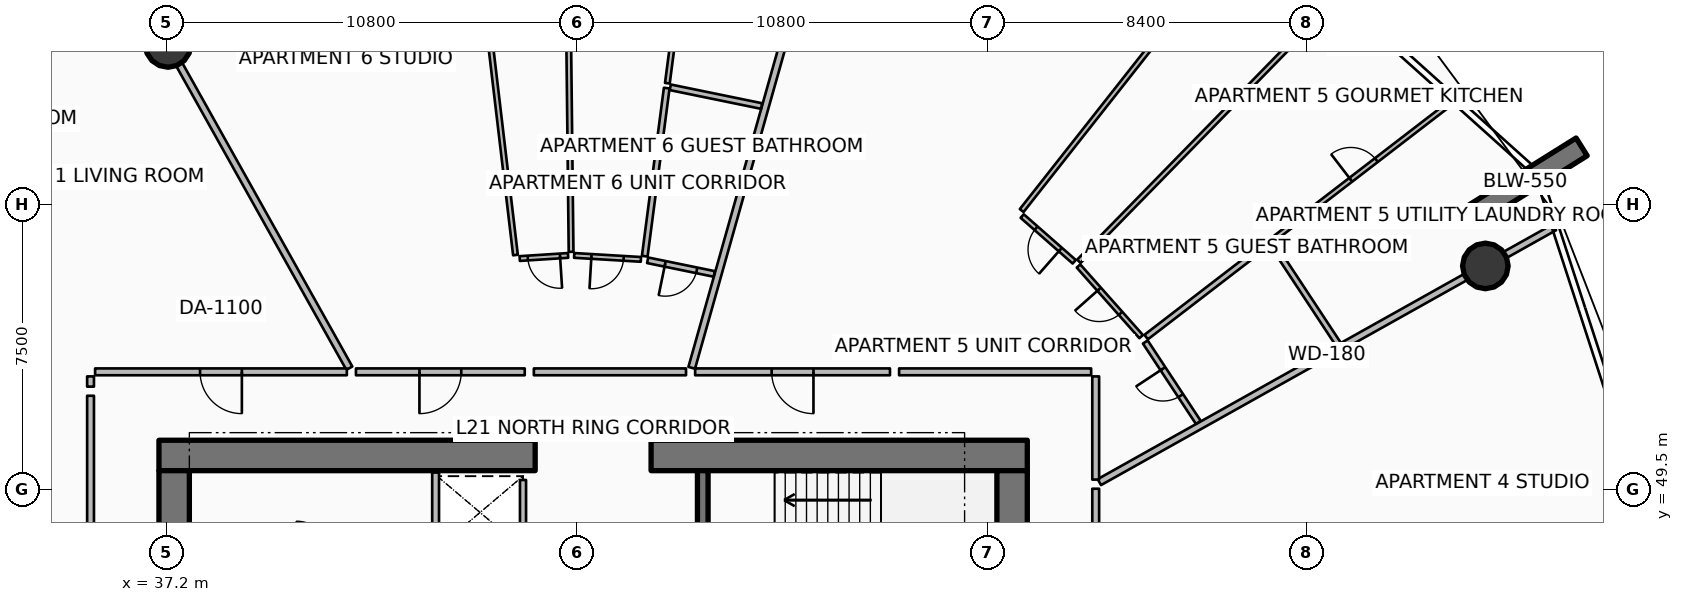
"""IFC4 building model, lengths in metres.
Left out: names, types, materials, properties, quantities, classifications, styles, units other than length and angle.
Written with IfcOpenShell. Run it as: python <this file> out.ifc"""

import sys

from ifc_helpers import new_model, si_unit, direction, frame, frame_2d, origin, origin_2d, place, context, subcontext, project, spatial, rectangle, circle, extrude, element, fill, save


model = new_model("IFC4")
c1 = context("Model", 3, precision=1e-05, world=origin(), true_north=direction((0.0, 1.0)))
c2 = subcontext(c1, "Body", "Model", "MODEL_VIEW")
j1 = project(units=[si_unit("LENGTHUNIT", "METRE"), si_unit("PLANEANGLEUNIT", "RADIAN")], contexts=[c1])
p1 = place(None, origin())
s1 = spatial("IfcSite", under=j1, at=p1, CompositionType="ELEMENT")
p2 = place(p1, origin())
s2 = spatial("IfcBuilding", under=s1, at=p2, CompositionType="ELEMENT")
p3 = place(p2, frame((0.0, 0.0, 86.4)))
s3 = spatial("IfcBuildingStorey", under=s2, at=p3, CompositionType="ELEMENT", Elevation=86.4)
p4 = place(p3, frame((37.0, 50.4, 0.0), z_axis=(0.0, 0.0, 1.0), x_axis=(1.0, 0.0, 0.0)))
e1 = element("IfcWall", 1, at=p4, inside=s3, PredefinedType="SHEAR", context=c2, shape_type="SweptSolid", body=[
    extrude(rectangle(XDim=9.9, YDim=0.8, at=frame_2d((4.95, 0.0))), origin(), (0.0, 0.0, 1.0), 3.75),
])
p5 = place(p3, frame((49.95, 50.4, 0.0), z_axis=(0.0, 0.0, 1.0), x_axis=(1.0, 0.0, 0.0)))
e2 = element("IfcWall", 2, at=p5, inside=s3, PredefinedType="SHEAR", context=c2, shape_type="SweptSolid", body=[
    extrude(rectangle(XDim=9.9, YDim=0.8, at=frame_2d((4.95, 0.0))), origin(), (0.0, 0.0, 1.0), 3.75),
])
for number, where, z_axis, x_axis in (
    (3, (37.4, 34.0, 0.0), (0.0, 0.0, 1.0), (0.0, 1.0, 0.0)),
    (4, (59.45, 34.0, 0.0), (0.0, 0.0, 1.0), (0.0, 1.0, 0.0)),
):
    element("IfcWall", number, at=place(p3, frame(where, z_axis=z_axis, x_axis=x_axis)), inside=s3, PredefinedType="SHEAR", context=c2, shape_type="SweptSolid", body=[
        extrude(rectangle(XDim=16.0, YDim=0.8, at=frame_2d((8.0, 0.0))), origin(), (0.0, 0.0, 1.0), 3.75),
    ])
p6 = place(p3, frame((51.31, 46.5, 0.0), z_axis=(0.0, 0.0, 1.0), x_axis=(0.0, 1.0, 0.0)))
e5 = element("IfcWall", 5, at=p6, inside=s3, PredefinedType="SHEAR", context=c2, shape_type="SweptSolid", body=[
    extrude(rectangle(XDim=3.5, YDim=0.28, at=frame_2d((1.75, 0.0))), origin(), (0.0, 0.0, 1.0), 3.75),
])
p7 = place(p3, frame((71.469, 56.665, 0.0), z_axis=(0.0, 0.0, 1.0), x_axis=(0.848053161125, 0.529911158502, 0.0)))
e6 = element("IfcWall", 6, at=p7, inside=s3, PredefinedType="SOLIDWALL", context=c2, shape_type="SweptSolid", body=[
    extrude(rectangle(XDim=3.5, YDim=0.55, at=frame_2d((1.75, 0.0))), origin(), (0.0, 0.0, 1.0), 3.75),
])
for number, where, z_axis, x_axis in (
    (7, (71.903, 55.386, 0.0), (0.0, 0.0, 1.0), (1.0, 0.0, 0.0)),
    (8, (37.24, 61.214, 0.0), (0.0, 0.0, 1.0), (1.0, 0.0, 0.0)),
):
    element("IfcColumn", number, at=place(p3, frame(where, z_axis=z_axis, x_axis=x_axis)), inside=s3, PredefinedType="COLUMN", context=c2, shape_type="SweptSolid", body=[
        extrude(circle(Radius=0.6, at=origin_2d()), origin(), (0.0, 0.0, 1.0), 3.5),
    ])
p8 = place(p3, frame((46.58, 48.045, 0.0), z_axis=(0.0, 0.0, 1.0), x_axis=(0.0, 1.0, 0.0)))
e9 = element("IfcWall", 9, at=p8, inside=s3, PredefinedType="PARTITIONING", context=c2, shape_type="SweptSolid", body=[
    extrude(rectangle(XDim=1.71, YDim=0.16, at=frame_2d((0.855, 0.0))), origin(), (0.0, 0.0, 1.0), 3.5),
])
p9 = place(p3, frame((44.28, 47.82, 0.0), z_axis=(0.0, 0.0, 1.0), x_axis=(0.0, 1.0, 0.0)))
e10 = element("IfcWall", 10, at=p9, inside=s3, PredefinedType="PARTITIONING", context=c2, shape_type="SweptSolid", body=[
    extrude(rectangle(XDim=2.13, YDim=0.18, at=frame_2d((1.065, 0.0))), origin(), (0.0, 0.0, 1.0), 3.5),
])
p10 = place(p3, frame((61.746, 49.698, 0.0), z_axis=(0.0, 0.0, 1.0), x_axis=(0.872489938668, 0.488632077256, 0.0)))
e11 = element("IfcWall", 11, at=p10, inside=s3, PredefinedType="PARTITIONING", context=c2, shape_type="SweptSolid", body=[
    extrude(rectangle(XDim=13.725, YDim=0.18, at=frame_2d((6.862, 0.0))), origin(), (0.0, 0.0, 1.0), 2.94),
])
p11 = place(p3, frame((51.019, 52.706, 0.0), z_axis=(0.0, 0.0, 1.0), x_axis=(0.271450895995, 0.962452290279, 0.0)))
e12 = element("IfcWall", 12, at=p11, inside=s3, PredefinedType="PARTITIONING", context=c2, shape_type="SweptSolid", body=[
    extrude(rectangle(XDim=15.014, YDim=0.18, at=frame_2d((7.507, 0.0))), origin(), (0.0, 0.0, 1.0), 2.94),
])
p12 = place(p3, frame((42.01, 52.696, 0.0), z_axis=(0.0, 0.0, 1.0), x_axis=(-0.488628442553, 0.872491974249, 0.0)))
e13 = element("IfcWall", 13, at=p12, inside=s3, PredefinedType="PARTITIONING", context=c2, shape_type="SweptSolid", body=[
    extrude(rectangle(XDim=11.563, YDim=0.18, at=frame_2d((5.782, 0.0))), origin(), (0.0, 0.0, 1.0), 2.94),
])
p13 = place(p3, frame((41.944, 52.6, 0.0), z_axis=(0.0, 0.0, 1.0), x_axis=(-1.0, 0.0, 0.0)))
e14 = element("IfcWall", 14, at=p13, inside=s3, PredefinedType="PARTITIONING", context=c2, shape_type="SweptSolid", body=[
    extrude(rectangle(XDim=6.624, YDim=0.18, at=frame_2d((3.312, 0.0))), origin(), (0.0, 0.0, 1.0), 2.94),
])
p14 = place(p13, frame((2.762, 0.0, 0.0)))
e15 = element("IfcOpeningElement", 15, at=p14, cuts=e14, PredefinedType="OPENING", context=c2, shape_type="SweptSolid", body=[
    extrude(rectangle(XDim=1.1, YDim=2.1, at=frame_2d((0.55, 1.05))), frame((0.0, 0.1, 0.0), z_axis=(0.0, -1.0, 0.0), x_axis=(1.0, 0.0, 0.0)), (0.0, 0.0, 1.0), 0.2),
])
p15 = place(p3, frame((35.2, 52.48, 0.0), z_axis=(0.0, 0.0, 1.0), x_axis=(0.0, -1.0, 0.0)))
e16 = element("IfcWall", 16, at=p15, inside=s3, PredefinedType="PARTITIONING", context=c2, shape_type="SweptSolid", body=[
    extrude(rectangle(XDim=0.269, YDim=0.18, at=frame_2d((0.135, 0.0))), origin(), (0.0, 0.0, 1.0), 2.94),
])
p16 = place(p3, frame((35.2, 51.971, 0.0), z_axis=(0.0, 0.0, 1.0), x_axis=(0.0, -1.0, 0.0)))
e17 = element("IfcWall", 17, at=p16, inside=s3, PredefinedType="PARTITIONING", context=c2, shape_type="SweptSolid", body=[
    extrude(rectangle(XDim=6.241, YDim=0.18, at=frame_2d((3.12, 0.0))), origin(), (0.0, 0.0, 1.0), 2.94),
])
p17 = place(p3, frame((61.65, 43.736, 0.0), z_axis=(0.0, 0.0, 1.0), x_axis=(0.0, 1.0, 0.0)))
e18 = element("IfcWall", 18, at=p17, inside=s3, PredefinedType="PARTITIONING", context=c2, shape_type="SweptSolid", body=[
    extrude(rectangle(XDim=5.789, YDim=0.18, at=frame_2d((2.895, 0.0))), origin(), (0.0, 0.0, 1.0), 2.94),
])
p18 = place(p17, frame((2.344, 0.0, 0.0)))
e19 = element("IfcOpeningElement", 19, at=p18, cuts=e18, PredefinedType="OPENING", context=c2, shape_type="SweptSolid", body=[
    extrude(rectangle(XDim=1.1, YDim=2.1, at=frame_2d((0.55, 1.05))), frame((0.0, 0.1, 0.0), z_axis=(0.0, -1.0, 0.0), x_axis=(1.0, 0.0, 0.0)), (0.0, 0.0, 1.0), 0.2),
])
p19 = place(p3, frame((56.236, 52.6, 0.0), z_axis=(0.0, 0.0, 1.0), x_axis=(-1.0, 0.0, 0.0)))
e20 = element("IfcWall", 20, at=p19, inside=s3, PredefinedType="PARTITIONING", context=c2, shape_type="SweptSolid", body=[
    extrude(rectangle(XDim=5.127, YDim=0.18, at=frame_2d((2.563, 0.0))), origin(), (0.0, 0.0, 1.0), 2.94),
])
p20 = place(p19, frame((2.013, 0.0, 0.0)))
e21 = element("IfcOpeningElement", 21, at=p20, cuts=e20, PredefinedType="OPENING", context=c2, shape_type="SweptSolid", body=[
    extrude(rectangle(XDim=1.1, YDim=2.1, at=frame_2d((0.55, 1.05))), frame((0.0, 0.1, 0.0), z_axis=(0.0, -1.0, 0.0), x_axis=(1.0, 0.0, 0.0)), (0.0, 0.0, 1.0), 0.2),
])
p21 = place(p3, frame((61.65, 49.764, 0.0), z_axis=(0.0, 0.0, 1.0), x_axis=(0.0, 1.0, 0.0)))
e22 = element("IfcWall", 22, at=p21, inside=s3, PredefinedType="PARTITIONING", context=c2, shape_type="SweptSolid", body=[
    extrude(rectangle(XDim=2.716, YDim=0.18, at=frame_2d((1.358, 0.0))), origin(), (0.0, 0.0, 1.0), 2.94),
])
p22 = place(p3, frame((61.53, 52.6, 0.0), z_axis=(0.0, 0.0, 1.0), x_axis=(-1.0, 0.0, 0.0)))
e23 = element("IfcWall", 23, at=p22, inside=s3, PredefinedType="PARTITIONING", context=c2, shape_type="SweptSolid", body=[
    extrude(rectangle(XDim=5.054, YDim=0.18, at=frame_2d((2.527, 0.0))), origin(), (0.0, 0.0, 1.0), 2.94),
])
p23 = place(p3, frame((59.702, 56.844, 0.0), z_axis=(0.0, 0.0, 1.0), x_axis=(0.619083405129, 0.785325243128, 0.0)))
e24 = element("IfcWall", 24, at=p23, inside=s3, PredefinedType="PARTITIONING", context=c2, shape_type="SweptSolid", body=[
    extrude(rectangle(XDim=9.769, YDim=0.125, at=frame_2d((4.885, 0.0))), origin(), (0.0, 0.0, 1.0), 2.94),
])
p24 = place(p3, frame((64.35, 51.271, 0.0), z_axis=(0.0, 0.0, 1.0), x_axis=(-0.550510405652, 0.83482830167, 0.0)))
e25 = element("IfcWall", 25, at=p24, inside=s3, PredefinedType="PARTITIONING", context=c2, shape_type="SweptSolid", body=[
    extrude(rectangle(XDim=2.532, YDim=0.15, at=frame_2d((1.266, 0.0))), origin(), (0.0, 0.0, 1.0), 2.94),
])
p25 = place(p24, frame((0.841, 0.0, 0.0)))
e26 = element("IfcOpeningElement", 26, at=p25, cuts=e25, PredefinedType="OPENING", context=c2, shape_type="SweptSolid", body=[
    extrude(rectangle(XDim=0.85, YDim=2.06, at=frame_2d((0.425, 1.03))), frame((0.0, 0.085, 0.0), z_axis=(0.0, -1.0, 0.0), x_axis=(1.0, 0.0, 0.0)), (0.0, 0.0, 1.0), 0.17),
])
p26 = place(p3, frame((68.031, 53.333, 0.0), z_axis=(0.0, 0.0, 1.0), x_axis=(-0.550480727927, 0.83484787128, 0.0)))
e27 = element("IfcWall", 27, at=p26, inside=s3, PredefinedType="PARTITIONING", context=c2, shape_type="SweptSolid", body=[
    extrude(rectangle(XDim=3.143, YDim=0.15, at=frame_2d((1.572, 0.0))), origin(), (0.0, 0.0, 1.0), 2.94),
])
p27 = place(p3, frame((62.978, 53.514, 0.0), z_axis=(0.0, 0.0, 1.0), x_axis=(0.792801485355, 0.609479946199, 0.0)))
e28 = element("IfcWall", 28, at=p27, inside=s3, PredefinedType="PARTITIONING", context=c2, shape_type="SweptSolid", body=[
    extrude(rectangle(XDim=4.09, YDim=0.15, at=frame_2d((2.045, 0.0))), origin(), (0.0, 0.0, 1.0), 2.94),
])
p28 = place(p3, frame((66.323, 56.086, 0.0), z_axis=(0.0, 0.0, 1.0), x_axis=(0.792792040596, 0.60949223159, 0.0)))
e29 = element("IfcWall", 29, at=p28, inside=s3, PredefinedType="PARTITIONING", context=c2, shape_type="SweptSolid", body=[
    extrude(rectangle(XDim=5.994, YDim=0.125, at=frame_2d((2.997, 0.0))), origin(), (0.0, 0.0, 1.0), 2.94),
])
p29 = place(p28, frame((2.572, 0.0, 0.0)))
e30 = element("IfcOpeningElement", 30, at=p29, cuts=e29, PredefinedType="OPENING", context=c2, shape_type="SweptSolid", body=[
    extrude(rectangle(XDim=0.85, YDim=2.06, at=frame_2d((0.425, 1.03))), frame((0.0, 0.073, 0.0), z_axis=(0.0, -1.0, 0.0), x_axis=(1.0, 0.0, 0.0)), (0.0, 0.0, 1.0), 0.145),
])
p30 = place(p3, frame((61.208, 55.508, 0.0), z_axis=(0.0, 0.0, 1.0), x_axis=(0.699096858951, 0.715026979774, 0.0)))
e31 = element("IfcWall", 31, at=p30, inside=s3, PredefinedType="PARTITIONING", context=c2, shape_type="SweptSolid", body=[
    extrude(rectangle(XDim=9.747, YDim=0.125, at=frame_2d((4.874, 0.0))), origin(), (0.0, 0.0, 1.0), 2.94),
])
p31 = place(p3, frame((62.846, 53.527, 0.0), z_axis=(0.0, 0.0, 1.0), x_axis=(-0.663881646848, 0.747837655497, 0.0)))
e32 = element("IfcWall", 32, at=p31, inside=s3, PredefinedType="PARTITIONING", context=c2, shape_type="SweptSolid", body=[
    extrude(rectangle(XDim=2.483, YDim=0.125, at=frame_2d((1.242, 0.0))), origin(), (0.0, 0.0, 1.0), 2.94),
])
p32 = place(p31, frame((0.817, 0.0, 0.0)))
e33 = element("IfcOpeningElement", 33, at=p32, cuts=e32, PredefinedType="OPENING", context=c2, shape_type="SweptSolid", body=[
    extrude(rectangle(XDim=0.85, YDim=2.06, at=frame_2d((0.425, 1.03))), frame((0.0, 0.073, 0.0), z_axis=(0.0, -1.0, 0.0), x_axis=(1.0, 0.0, 0.0)), (0.0, 0.0, 1.0), 0.145),
])
p33 = place(p3, frame((61.084, 55.497, 0.0), z_axis=(0.0, 0.0, 1.0), x_axis=(-0.75124742024, 0.660020691784, 0.0)))
e34 = element("IfcWall", 34, at=p33, inside=s3, PredefinedType="PARTITIONING", context=c2, shape_type="SweptSolid", body=[
    extrude(rectangle(XDim=1.823, YDim=0.125, at=frame_2d((0.911, 0.0))), origin(), (0.0, 0.0, 1.0), 2.94),
])
p34 = place(p33, frame((0.486, 0.0, 0.0)))
e35 = element("IfcOpeningElement", 35, at=p34, cuts=e34, PredefinedType="OPENING", context=c2, shape_type="SweptSolid", body=[
    extrude(rectangle(XDim=0.85, YDim=2.06, at=frame_2d((0.425, 1.03))), frame((0.0, 0.073, 0.0), z_axis=(0.0, -1.0, 0.0), x_axis=(1.0, 0.0, 0.0)), (0.0, 0.0, 1.0), 0.145),
])
p35 = place(p3, frame((46.625, 52.6, 0.0), z_axis=(0.0, 0.0, 1.0), x_axis=(-1.0, 0.0, 0.0)))
e36 = element("IfcWall", 36, at=p35, inside=s3, PredefinedType="PARTITIONING", context=c2, shape_type="SweptSolid", body=[
    extrude(rectangle(XDim=4.442, YDim=0.18, at=frame_2d((2.221, 0.0))), origin(), (0.0, 0.0, 1.0), 2.94),
])
p36 = place(p35, frame((1.671, 0.0, 0.0)))
e37 = element("IfcOpeningElement", 37, at=p36, cuts=e36, PredefinedType="OPENING", context=c2, shape_type="SweptSolid", body=[
    extrude(rectangle(XDim=1.1, YDim=2.1, at=frame_2d((0.55, 1.05))), frame((0.0, 0.1, 0.0), z_axis=(0.0, -1.0, 0.0), x_axis=(1.0, 0.0, 0.0)), (0.0, 0.0, 1.0), 0.2),
])
p37 = place(p3, frame((50.869, 52.6, 0.0), z_axis=(0.0, 0.0, 1.0), x_axis=(-1.0, 0.0, 0.0)))
e38 = element("IfcWall", 38, at=p37, inside=s3, PredefinedType="PARTITIONING", context=c2, shape_type="SweptSolid", body=[
    extrude(rectangle(XDim=4.004, YDim=0.18, at=frame_2d((2.002, 0.0))), origin(), (0.0, 0.0, 1.0), 2.94),
])
p38 = place(p3, frame((46.382, 55.674, 0.0), z_axis=(0.0, 0.0, 1.0), x_axis=(-0.117533197276, 0.99306895407, 0.0)))
e39 = element("IfcWall", 39, at=p38, inside=s3, PredefinedType="PARTITIONING", context=c2, shape_type="SweptSolid", body=[
    extrude(rectangle(XDim=10.153, YDim=0.125, at=frame_2d((5.077, 0.0))), origin(), (0.0, 0.0, 1.0), 2.94),
])
p39 = place(p3, frame((51.612, 55.176, 0.0), z_axis=(0.0, 0.0, 1.0), x_axis=(-0.979559973395, 0.201152326663, 0.0)))
e40 = element("IfcWall", 40, at=p39, inside=s3, PredefinedType="PARTITIONING", context=c2, shape_type="SweptSolid", body=[
    extrude(rectangle(XDim=1.789, YDim=0.15, at=frame_2d((0.895, 0.0))), origin(), (0.0, 0.0, 1.0), 2.94),
])
p40 = place(p39, frame((0.469, 0.0, 0.0)))
e41 = element("IfcOpeningElement", 41, at=p40, cuts=e40, PredefinedType="OPENING", context=c2, shape_type="SweptSolid", body=[
    extrude(rectangle(XDim=0.85, YDim=2.06, at=frame_2d((0.425, 1.03))), frame((0.0, 0.085, 0.0), z_axis=(0.0, -1.0, 0.0), x_axis=(1.0, 0.0, 0.0)), (0.0, 0.0, 1.0), 0.17),
])
p41 = place(p3, frame((52.858, 59.594, 0.0), z_axis=(0.0, 0.0, 1.0), x_axis=(-0.979569035828, 0.201108189903, 0.0)))
e42 = element("IfcWall", 42, at=p41, inside=s3, PredefinedType="PARTITIONING", context=c2, shape_type="SweptSolid", body=[
    extrude(rectangle(XDim=2.453, YDim=0.15, at=frame_2d((1.227, 0.0))), origin(), (0.0, 0.0, 1.0), 2.94),
])
p42 = place(p3, frame((49.783, 55.643, 0.0), z_axis=(0.0, 0.0, 1.0), x_axis=(0.129624682181, 0.991563130501, 0.0)))
e43 = element("IfcWall", 43, at=p42, inside=s3, PredefinedType="PARTITIONING", context=c2, shape_type="SweptSolid", body=[
    extrude(rectangle(XDim=4.46, YDim=0.15, at=frame_2d((2.23, 0.0))), origin(), (0.0, 0.0, 1.0), 2.94),
])
p43 = place(p3, frame((50.378, 60.194, 0.0), z_axis=(0.0, 0.0, 1.0), x_axis=(0.129622249643, 0.991563448498, 0.0)))
e44 = element("IfcWall", 44, at=p43, inside=s3, PredefinedType="PARTITIONING", context=c2, shape_type="SweptSolid", body=[
    extrude(rectangle(XDim=6.526, YDim=0.125, at=frame_2d((3.263, 0.0))), origin(), (0.0, 0.0, 1.0), 2.94),
])
p44 = place(p43, frame((2.838, 0.0, 0.0)))
e45 = element("IfcOpeningElement", 45, at=p44, cuts=e44, PredefinedType="OPENING", context=c2, shape_type="SweptSolid", body=[
    extrude(rectangle(XDim=0.85, YDim=2.06, at=frame_2d((0.425, 1.03))), frame((0.0, 0.073, 0.0), z_axis=(0.0, -1.0, 0.0), x_axis=(1.0, 0.0, 0.0)), (0.0, 0.0, 1.0), 0.145),
])
p45 = place(p3, frame((47.845, 55.758, 0.0), z_axis=(0.0, 0.0, 1.0), x_axis=(-0.011264572172, 0.999936552694, 0.0)))
e46 = element("IfcWall", 46, at=p45, inside=s3, PredefinedType="PARTITIONING", context=c2, shape_type="SweptSolid", body=[
    extrude(rectangle(XDim=10.382, YDim=0.125, at=frame_2d((5.191, 0.0))), origin(), (0.0, 0.0, 1.0), 2.94),
])
p46 = place(p3, frame((49.682, 55.559, 0.0), z_axis=(0.0, 0.0, 1.0), x_axis=(-0.99824215698, 0.059267158097, 0.0)))
e47 = element("IfcWall", 47, at=p46, inside=s3, PredefinedType="PARTITIONING", context=c2, shape_type="SweptSolid", body=[
    extrude(rectangle(XDim=1.759, YDim=0.125, at=frame_2d((0.879, 0.0))), origin(), (0.0, 0.0, 1.0), 2.94),
])
p47 = place(p46, frame((0.455, 0.0, 0.0)))
e48 = element("IfcOpeningElement", 48, at=p47, cuts=e47, PredefinedType="OPENING", context=c2, shape_type="SweptSolid", body=[
    extrude(rectangle(XDim=0.85, YDim=2.06, at=frame_2d((0.425, 1.03))), frame((0.0, 0.073, 0.0), z_axis=(0.0, -1.0, 0.0), x_axis=(1.0, 0.0, 0.0)), (0.0, 0.0, 1.0), 0.145),
])
p48 = place(p3, frame((47.766, 55.663, 0.0), z_axis=(0.0, 0.0, 1.0), x_axis=(-0.997930857608, -0.064296216329, 0.0)))
e49 = element("IfcWall", 49, at=p48, inside=s3, PredefinedType="PARTITIONING", context=c2, shape_type="SweptSolid", body=[
    extrude(rectangle(XDim=1.276, YDim=0.125, at=frame_2d((0.638, 0.0))), origin(), (0.0, 0.0, 1.0), 2.94),
])
p49 = place(p48, frame((0.213, 0.0, 0.0)))
e50 = element("IfcOpeningElement", 50, at=p49, cuts=e49, PredefinedType="OPENING", context=c2, shape_type="SweptSolid", body=[
    extrude(rectangle(XDim=0.85, YDim=2.06, at=frame_2d((0.425, 1.03))), frame((0.0, 0.073, 0.0), z_axis=(0.0, -1.0, 0.0), x_axis=(1.0, 0.0, 0.0)), (0.0, 0.0, 1.0), 0.145),
])
p50 = place(p14, origin())
e51 = element("IfcDoor", 51, at=p50, inside=s3, OperationType="SINGLE_SWING_LEFT", PredefinedType="DOOR", context=c2, shape_type="SweptSolid", body=[
    extrude(rectangle(XDim=1.1, YDim=2.1, at=frame_2d((0.55, 1.05))), frame((0.0, 0.025, 0.0), z_axis=(0.0, -1.0, 0.0), x_axis=(1.0, 0.0, 0.0)), (0.0, 0.0, 1.0), 0.05),
])
fill(e15, e51)
p51 = place(p20, origin())
e52 = element("IfcDoor", 52, at=p51, inside=s3, OperationType="SINGLE_SWING_LEFT", PredefinedType="DOOR", context=c2, shape_type="SweptSolid", body=[
    extrude(rectangle(XDim=1.1, YDim=2.1, at=frame_2d((0.55, 1.05))), frame((0.0, 0.025, 0.0), z_axis=(0.0, -1.0, 0.0), x_axis=(1.0, 0.0, 0.0)), (0.0, 0.0, 1.0), 0.05),
])
fill(e21, e52)
p52 = place(p25, origin())
e53 = element("IfcDoor", 53, at=p52, inside=s3, OperationType="SINGLE_SWING_RIGHT", PredefinedType="DOOR", context=c2, shape_type="SweptSolid", body=[
    extrude(rectangle(XDim=0.85, YDim=2.06, at=frame_2d((0.425, 1.03))), frame((0.0, 0.025, 0.0), z_axis=(0.0, -1.0, 0.0), x_axis=(1.0, 0.0, 0.0)), (0.0, 0.0, 1.0), 0.05),
])
fill(e26, e53)
p53 = place(p29, origin())
e54 = element("IfcDoor", 54, at=p53, inside=s3, OperationType="SINGLE_SWING_LEFT", PredefinedType="DOOR", context=c2, shape_type="SweptSolid", body=[
    extrude(rectangle(XDim=0.85, YDim=2.06, at=frame_2d((0.425, 1.03))), frame((0.0, 0.025, 0.0), z_axis=(0.0, -1.0, 0.0), x_axis=(1.0, 0.0, 0.0)), (0.0, 0.0, 1.0), 0.05),
])
fill(e30, e54)
p54 = place(p32, origin())
e55 = element("IfcDoor", 55, at=p54, inside=s3, OperationType="SINGLE_SWING_RIGHT", PredefinedType="DOOR", context=c2, shape_type="SweptSolid", body=[
    extrude(rectangle(XDim=0.85, YDim=2.06, at=frame_2d((0.425, 1.03))), frame((0.0, 0.025, 0.0), z_axis=(0.0, -1.0, 0.0), x_axis=(1.0, 0.0, 0.0)), (0.0, 0.0, 1.0), 0.05),
])
fill(e33, e55)
p55 = place(p34, origin())
e56 = element("IfcDoor", 56, at=p55, inside=s3, OperationType="SINGLE_SWING_LEFT", PredefinedType="DOOR", context=c2, shape_type="SweptSolid", body=[
    extrude(rectangle(XDim=0.85, YDim=2.06, at=frame_2d((0.425, 1.03))), frame((0.0, 0.025, 0.0), z_axis=(0.0, -1.0, 0.0), x_axis=(1.0, 0.0, 0.0)), (0.0, 0.0, 1.0), 0.05),
])
fill(e35, e56)
p56 = place(p36, origin())
e57 = element("IfcDoor", 57, at=p56, inside=s3, OperationType="SINGLE_SWING_RIGHT", PredefinedType="DOOR", context=c2, shape_type="SweptSolid", body=[
    extrude(rectangle(XDim=1.1, YDim=2.1, at=frame_2d((0.55, 1.05))), frame((0.0, 0.025, 0.0), z_axis=(0.0, -1.0, 0.0), x_axis=(1.0, 0.0, 0.0)), (0.0, 0.0, 1.0), 0.05),
])
fill(e37, e57)
p57 = place(p40, origin())
e58 = element("IfcDoor", 58, at=p57, inside=s3, OperationType="SINGLE_SWING_RIGHT", PredefinedType="DOOR", context=c2, shape_type="SweptSolid", body=[
    extrude(rectangle(XDim=0.85, YDim=2.06, at=frame_2d((0.425, 1.03))), frame((0.0, 0.025, 0.0), z_axis=(0.0, -1.0, 0.0), x_axis=(1.0, 0.0, 0.0)), (0.0, 0.0, 1.0), 0.05),
])
fill(e41, e58)
p58 = place(p47, origin())
e59 = element("IfcDoor", 59, at=p58, inside=s3, OperationType="SINGLE_SWING_RIGHT", PredefinedType="DOOR", context=c2, shape_type="SweptSolid", body=[
    extrude(rectangle(XDim=0.85, YDim=2.06, at=frame_2d((0.425, 1.03))), frame((0.0, 0.025, 0.0), z_axis=(0.0, -1.0, 0.0), x_axis=(1.0, 0.0, 0.0)), (0.0, 0.0, 1.0), 0.05),
])
fill(e48, e59)
p59 = place(p49, origin())
e60 = element("IfcDoor", 60, at=p59, inside=s3, OperationType="SINGLE_SWING_LEFT", PredefinedType="DOOR", context=c2, shape_type="SweptSolid", body=[
    extrude(rectangle(XDim=0.85, YDim=2.06, at=frame_2d((0.425, 1.03))), frame((0.0, 0.025, 0.0), z_axis=(0.0, -1.0, 0.0), x_axis=(1.0, 0.0, 0.0)), (0.0, 0.0, 1.0), 0.05),
])
fill(e50, e60)
save(model, sys.argv[1])
